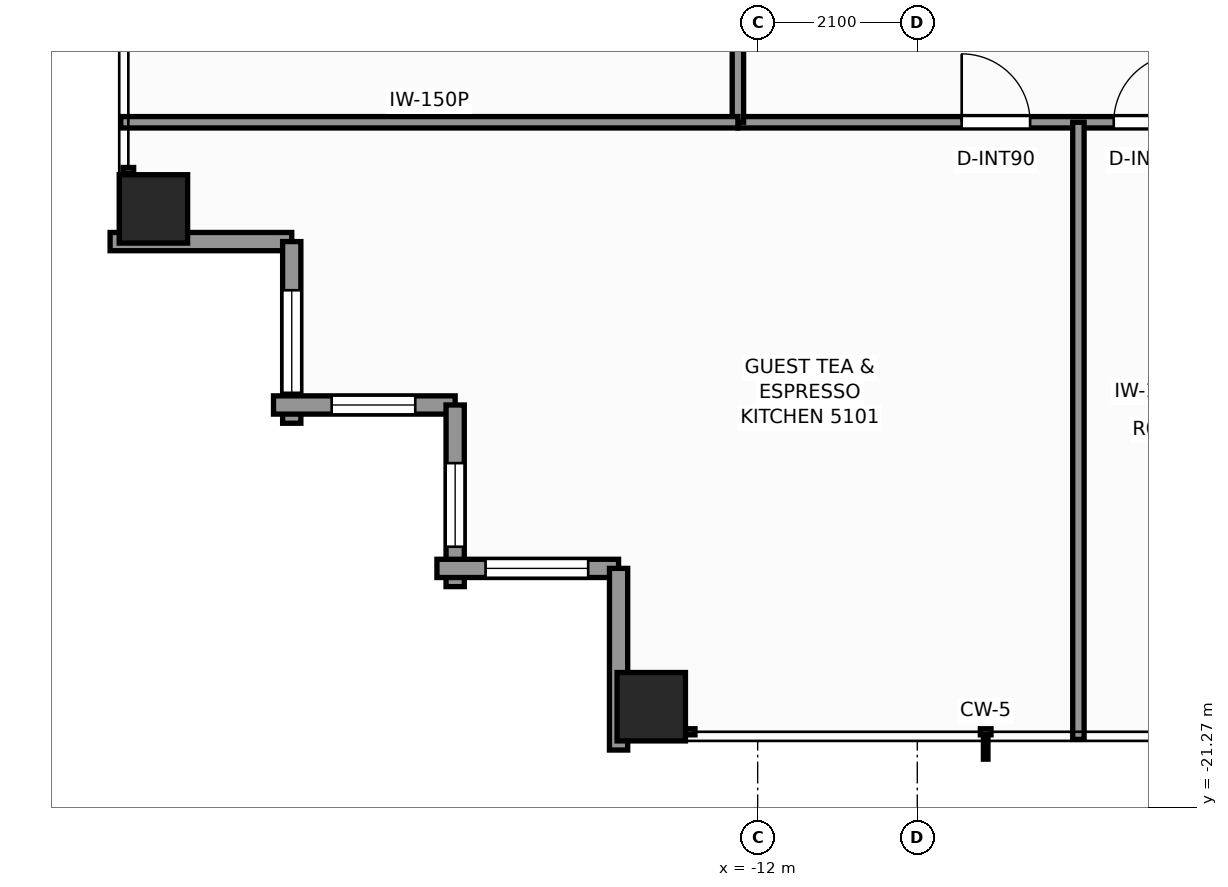
"""IFC4 building model, lengths in metres.
Left out: names, types, materials, properties, quantities, classifications, styles, units other than length and angle.
Written with IfcOpenShell. Run it as: python <this file> out.ifc"""

import sys

from ifc_helpers import new_model, si_unit, direction, frame, frame_2d, origin, origin_2d, place, context, subcontext, project, spatial, rectangle, extrude, element, fill, save


model = new_model("IFC4")
c1 = context("Model", 3, precision=1e-05, world=origin(), true_north=direction((0.0, 1.0)))
c2 = subcontext(c1, "Body", "Model", "MODEL_VIEW")
j1 = project(units=[si_unit("LENGTHUNIT", "METRE"), si_unit("PLANEANGLEUNIT", "RADIAN")], contexts=[c1])
p1 = place(None, origin())
s1 = spatial("IfcSite", under=j1, at=p1, CompositionType="ELEMENT")
p2 = place(p1, origin())
s2 = spatial("IfcBuilding", under=s1, at=p2, CompositionType="ELEMENT")
p3 = place(p2, frame((0.0, 0.0, 176.7)))
s3 = spatial("IfcBuildingStorey", under=s2, at=p3, CompositionType="ELEMENT", Elevation=176.7)
for number, where, z_axis, x_axis in (
    (1, (-13.4, -19.95, 0.0), (0.0, 0.0, 1.0), (1.0, 0.0, 0.0)),
    (2, (-19.95, -13.4, 0.0), (0.0, 0.0, 1.0), (1.0, 0.0, 0.0)),
):
    element("IfcColumn", number, at=place(p3, frame(where, z_axis=z_axis, x_axis=x_axis)), inside=s3, PredefinedType="COLUMN", context=c2, shape_type="SweptSolid", body=[
        extrude(rectangle(XDim=0.9, YDim=0.9, at=origin_2d()), origin(), (0.0, 0.0, 1.0), 3.3),
    ])
p4 = place(p3, frame((-18.13, -13.83, 0.0), z_axis=(0.0, 0.0, 1.0), x_axis=(-1.0, 0.0, 0.0)))
e3 = element("IfcWall", 3, at=p4, inside=s3, PredefinedType="STANDARD", context=c2, shape_type="SweptSolid", body=[
    extrude(rectangle(XDim=2.39, YDim=0.24, at=frame_2d((1.195, 0.0))), origin(), (0.0, 0.0, 1.0), 2.463),
])
p5 = place(p3, frame((-18.13, -16.22, 0.0), z_axis=(0.0, 0.0, 1.0), x_axis=(0.0, 1.0, 0.0)))
e4 = element("IfcWall", 4, at=p5, inside=s3, PredefinedType="STANDARD", context=c2, shape_type="SweptSolid", body=[
    extrude(rectangle(XDim=2.39, YDim=0.24, at=frame_2d((1.195, 0.0))), origin(), (0.0, 0.0, 1.0), 2.463),
])
p6 = place(p5, frame((0.4, 0.0, 0.65)))
e5 = element("IfcOpeningElement", 5, at=p6, cuts=e4, PredefinedType="OPENING", context=c2, shape_type="SweptSolid", body=[
    extrude(rectangle(XDim=1.35, YDim=1.55, at=frame_2d((0.675, 0.775))), frame((0.0, 0.13, 0.0), z_axis=(0.0, -1.0, 0.0), x_axis=(1.0, 0.0, 0.0)), (0.0, 0.0, 1.0), 0.26),
])
p7 = place(p3, frame((-15.98, -15.98, 0.0), z_axis=(0.0, 0.0, 1.0), x_axis=(-1.0, 0.0, 0.0)))
e6 = element("IfcWall", 6, at=p7, inside=s3, PredefinedType="STANDARD", context=c2, shape_type="SweptSolid", body=[
    extrude(rectangle(XDim=2.39, YDim=0.24, at=frame_2d((1.195, 0.0))), origin(), (0.0, 0.0, 1.0), 2.463),
])
p8 = place(p7, frame((0.525, 0.0, 0.65)))
e7 = element("IfcOpeningElement", 7, at=p8, cuts=e6, PredefinedType="OPENING", context=c2, shape_type="SweptSolid", body=[
    extrude(rectangle(XDim=1.1, YDim=1.45, at=frame_2d((0.55, 0.725))), frame((0.0, 0.13, 0.0), z_axis=(0.0, -1.0, 0.0), x_axis=(1.0, 0.0, 0.0)), (0.0, 0.0, 1.0), 0.26),
])
p9 = place(p3, frame((-15.98, -18.37, 0.0), z_axis=(0.0, 0.0, 1.0), x_axis=(0.0, 1.0, 0.0)))
e8 = element("IfcWall", 8, at=p9, inside=s3, PredefinedType="STANDARD", context=c2, shape_type="SweptSolid", body=[
    extrude(rectangle(XDim=2.39, YDim=0.24, at=frame_2d((1.195, 0.0))), origin(), (0.0, 0.0, 1.0), 2.463),
])
p10 = place(p9, frame((0.525, 0.0, 0.65)))
e9 = element("IfcOpeningElement", 9, at=p10, cuts=e8, PredefinedType="OPENING", context=c2, shape_type="SweptSolid", body=[
    extrude(rectangle(XDim=1.1, YDim=1.45, at=frame_2d((0.55, 0.725))), frame((0.0, 0.13, 0.0), z_axis=(0.0, -1.0, 0.0), x_axis=(1.0, 0.0, 0.0)), (0.0, 0.0, 1.0), 0.26),
])
p11 = place(p3, frame((-13.83, -18.13, 0.0), z_axis=(0.0, 0.0, 1.0), x_axis=(-1.0, 0.0, 0.0)))
e10 = element("IfcWall", 10, at=p11, inside=s3, PredefinedType="STANDARD", context=c2, shape_type="SweptSolid", body=[
    extrude(rectangle(XDim=2.39, YDim=0.24, at=frame_2d((1.195, 0.0))), origin(), (0.0, 0.0, 1.0), 2.463),
])
p12 = place(p11, frame((0.4, 0.0, 0.65)))
e11 = element("IfcOpeningElement", 11, at=p12, cuts=e10, PredefinedType="OPENING", context=c2, shape_type="SweptSolid", body=[
    extrude(rectangle(XDim=1.35, YDim=1.55, at=frame_2d((0.675, 0.775))), frame((0.0, 0.13, 0.0), z_axis=(0.0, -1.0, 0.0), x_axis=(1.0, 0.0, 0.0)), (0.0, 0.0, 1.0), 0.26),
])
p13 = place(p3, frame((-13.83, -20.52, 0.0), z_axis=(0.0, 0.0, 1.0), x_axis=(0.0, 1.0, 0.0)))
e12 = element("IfcWall", 12, at=p13, inside=s3, PredefinedType="STANDARD", context=c2, shape_type="SweptSolid", body=[
    extrude(rectangle(XDim=2.39, YDim=0.24, at=frame_2d((1.195, 0.0))), origin(), (0.0, 0.0, 1.0), 2.463),
])
p14 = place(p3, frame((-12.26, -12.26, 0.0), z_axis=(0.0, 0.0, 1.0), x_axis=(1.0, 0.0, 0.0)))
e13 = element("IfcWall", 13, at=p14, inside=s3, PredefinedType="PARTITIONING", context=c2, shape_type="SweptSolid", body=[
    extrude(rectangle(XDim=24.84, YDim=0.15, at=frame_2d((12.42, 0.0))), origin(), (0.0, 0.0, 1.0), 2.369),
])
p15 = place(p14, frame((2.944, 0.0, 0.0)))
e14 = element("IfcOpeningElement", 14, at=p15, cuts=e13, PredefinedType="OPENING", context=c2, shape_type="SweptSolid", body=[
    extrude(rectangle(XDim=0.9, YDim=2.06, at=frame_2d((0.45, 1.03))), frame((0.0, 0.085, 0.0), z_axis=(0.0, -1.0, 0.0), x_axis=(1.0, 0.0, 0.0)), (0.0, 0.0, 1.0), 0.17),
])
p16 = place(p14, frame((4.945, 0.0, 0.0)))
e15 = element("IfcOpeningElement", 15, at=p16, cuts=e13, PredefinedType="OPENING", context=c2, shape_type="SweptSolid", body=[
    extrude(rectangle(XDim=0.9, YDim=2.06, at=frame_2d((0.45, 1.03))), frame((0.0, 0.085, 0.0), z_axis=(0.0, -1.0, 0.0), x_axis=(1.0, 0.0, 0.0)), (0.0, 0.0, 1.0), 0.17),
])
p17 = place(p14, frame((8.611, 0.0, 0.0)))
e16 = element("IfcOpeningElement", 16, at=p17, cuts=e13, PredefinedType="OPENING", context=c2, shape_type="SweptSolid", body=[
    extrude(rectangle(XDim=0.95, YDim=2.06, at=frame_2d((0.475, 1.03))), frame((0.0, 0.085, 0.0), z_axis=(0.0, -1.0, 0.0), x_axis=(1.0, 0.0, 0.0)), (0.0, 0.0, 1.0), 0.17),
])
p18 = place(p14, frame((13.84, 0.0, 0.0)))
e17 = element("IfcOpeningElement", 17, at=p18, cuts=e13, PredefinedType="OPENING", context=c2, shape_type="SweptSolid", body=[
    extrude(rectangle(XDim=0.9, YDim=2.06, at=frame_2d((0.45, 1.03))), frame((0.0, 0.085, 0.0), z_axis=(0.0, -1.0, 0.0), x_axis=(1.0, 0.0, 0.0)), (0.0, 0.0, 1.0), 0.17),
])
p19 = place(p14, frame((18.5, 0.0, 0.0)))
e18 = element("IfcOpeningElement", 18, at=p19, cuts=e13, PredefinedType="OPENING", context=c2, shape_type="SweptSolid", body=[
    extrude(rectangle(XDim=0.9, YDim=2.06, at=frame_2d((0.45, 1.03))), frame((0.0, 0.085, 0.0), z_axis=(0.0, -1.0, 0.0), x_axis=(1.0, 0.0, 0.0)), (0.0, 0.0, 1.0), 0.17),
])
p20 = place(p14, frame((20.552, 0.0, 0.0)))
e19 = element("IfcOpeningElement", 19, at=p20, cuts=e13, PredefinedType="OPENING", context=c2, shape_type="SweptSolid", body=[
    extrude(rectangle(XDim=0.95, YDim=2.06, at=frame_2d((0.475, 1.03))), frame((0.0, 0.085, 0.0), z_axis=(0.0, -1.0, 0.0), x_axis=(1.0, 0.0, 0.0)), (0.0, 0.0, 1.0), 0.17),
])
p21 = place(p3, frame((-12.26, -12.26, 0.0), z_axis=(0.0, 0.0, 1.0), x_axis=(0.0, 1.0, 0.0)))
e20 = element("IfcWall", 20, at=p21, inside=s3, PredefinedType="PARTITIONING", context=c2, shape_type="SweptSolid", body=[
    extrude(rectangle(XDim=24.84, YDim=0.15, at=frame_2d((12.42, 0.0))), origin(), (0.0, 0.0, 1.0), 2.369),
])
p22 = place(p21, frame((3.229, 0.0, 0.0)))
e21 = element("IfcOpeningElement", 21, at=p22, cuts=e20, PredefinedType="OPENING", context=c2, shape_type="SweptSolid", body=[
    extrude(rectangle(XDim=0.95, YDim=2.06, at=frame_2d((0.475, 1.03))), frame((0.0, 0.085, 0.0), z_axis=(0.0, -1.0, 0.0), x_axis=(1.0, 0.0, 0.0)), (0.0, 0.0, 1.0), 0.17),
])
p23 = place(p21, frame((13.815, 0.0, 0.0)))
e22 = element("IfcOpeningElement", 22, at=p23, cuts=e20, PredefinedType="OPENING", context=c2, shape_type="SweptSolid", body=[
    extrude(rectangle(XDim=0.95, YDim=2.06, at=frame_2d((0.475, 1.03))), frame((0.0, 0.085, 0.0), z_axis=(0.0, -1.0, 0.0), x_axis=(1.0, 0.0, 0.0)), (0.0, 0.0, 1.0), 0.17),
])
p24 = place(p21, frame((20.793, 0.0, 0.0)))
e23 = element("IfcOpeningElement", 23, at=p24, cuts=e20, PredefinedType="OPENING", context=c2, shape_type="SweptSolid", body=[
    extrude(rectangle(XDim=0.95, YDim=2.06, at=frame_2d((0.475, 1.03))), frame((0.0, 0.085, 0.0), z_axis=(0.0, -1.0, 0.0), x_axis=(1.0, 0.0, 0.0)), (0.0, 0.0, 1.0), 0.17),
])
p25 = place(p3, frame((-20.38, -12.26, 0.0), z_axis=(0.0, 0.0, 1.0), x_axis=(1.0, 0.0, 0.0)))
e24 = element("IfcWall", 24, at=p25, inside=s3, PredefinedType="PARTITIONING", context=c2, shape_type="SweptSolid", body=[
    extrude(rectangle(XDim=8.12, YDim=0.15, at=frame_2d((4.06, 0.0))), origin(), (0.0, 0.0, 1.0), 2.369),
])
p26 = place(p3, frame((-7.78, -20.38, 0.0), z_axis=(0.0, 0.0, 1.0), x_axis=(0.0, 1.0, 0.0)))
e25 = element("IfcWall", 25, at=p26, inside=s3, PredefinedType="PARTITIONING", context=c2, shape_type="SweptSolid", body=[
    extrude(rectangle(XDim=8.12, YDim=0.15, at=frame_2d((4.06, 0.0))), origin(), (0.0, 0.0, 1.0), 2.453),
])
p27 = place(p6, origin())
e26 = element("IfcWindow", 26, at=p27, inside=s3, PartitioningType="SINGLE_PANEL", PredefinedType="WINDOW", context=c2, shape_type="SweptSolid", body=[
    extrude(rectangle(XDim=1.35, YDim=1.55, at=frame_2d((0.675, 0.775))), frame((0.0, 0.03, 0.0), z_axis=(0.0, -1.0, 0.0), x_axis=(1.0, 0.0, 0.0)), (0.0, 0.0, 1.0), 0.06),
])
fill(e5, e26)
p28 = place(p8, origin())
e27 = element("IfcWindow", 27, at=p28, inside=s3, PartitioningType="SINGLE_PANEL", PredefinedType="WINDOW", context=c2, shape_type="SweptSolid", body=[
    extrude(rectangle(XDim=1.1, YDim=1.45, at=frame_2d((0.55, 0.725))), frame((0.0, 0.03, 0.0), z_axis=(0.0, -1.0, 0.0), x_axis=(1.0, 0.0, 0.0)), (0.0, 0.0, 1.0), 0.06),
])
fill(e7, e27)
p29 = place(p10, origin())
e28 = element("IfcWindow", 28, at=p29, inside=s3, PartitioningType="SINGLE_PANEL", PredefinedType="WINDOW", context=c2, shape_type="SweptSolid", body=[
    extrude(rectangle(XDim=1.1, YDim=1.45, at=frame_2d((0.55, 0.725))), frame((0.0, 0.03, 0.0), z_axis=(0.0, -1.0, 0.0), x_axis=(1.0, 0.0, 0.0)), (0.0, 0.0, 1.0), 0.06),
])
fill(e9, e28)
p30 = place(p12, origin())
e29 = element("IfcWindow", 29, at=p30, inside=s3, PartitioningType="SINGLE_PANEL", PredefinedType="WINDOW", context=c2, shape_type="SweptSolid", body=[
    extrude(rectangle(XDim=1.35, YDim=1.55, at=frame_2d((0.675, 0.775))), frame((0.0, 0.03, 0.0), z_axis=(0.0, -1.0, 0.0), x_axis=(1.0, 0.0, 0.0)), (0.0, 0.0, 1.0), 0.06),
])
fill(e11, e29)
p31 = place(p15, origin())
e30 = element("IfcDoor", 30, at=p31, inside=s3, OperationType="SINGLE_SWING_LEFT", PredefinedType="DOOR", context=c2, shape_type="SweptSolid", body=[
    extrude(rectangle(XDim=0.9, YDim=2.06, at=frame_2d((0.45, 1.03))), frame((0.0, 0.025, 0.0), z_axis=(0.0, -1.0, 0.0), x_axis=(1.0, 0.0, 0.0)), (0.0, 0.0, 1.0), 0.05),
])
fill(e14, e30)
p32 = place(p16, origin())
e31 = element("IfcDoor", 31, at=p32, inside=s3, OperationType="SINGLE_SWING_RIGHT", PredefinedType="DOOR", context=c2, shape_type="SweptSolid", body=[
    extrude(rectangle(XDim=0.9, YDim=2.06, at=frame_2d((0.45, 1.03))), frame((0.0, 0.025, 0.0), z_axis=(0.0, -1.0, 0.0), x_axis=(1.0, 0.0, 0.0)), (0.0, 0.0, 1.0), 0.05),
])
fill(e15, e31)
save(model, sys.argv[1])
